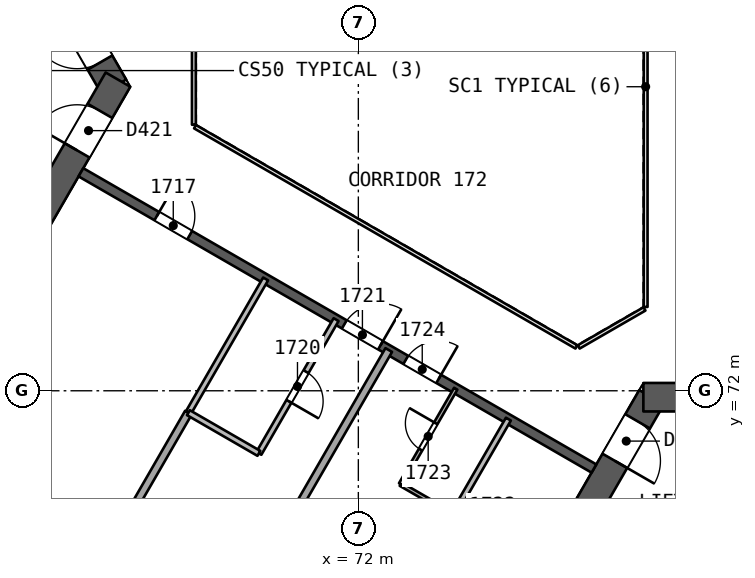
"""IFC4 building model, lengths in metres.
Left out: names, types, materials, properties, quantities, classifications, styles, units other than length and angle.
Written with IfcOpenShell. Run it as: python <this file> out.ifc"""

import sys

from ifc_helpers import new_model, si_unit, direction, frame, frame_2d, origin, place, context, subcontext, project, spatial, rectangle, extrude, element, fill, save


model = new_model("IFC4")
c1 = context("Model", 3, precision=1e-05, world=origin(), true_north=direction((0.0, 1.0)))
c2 = subcontext(c1, "Body", "Model", "MODEL_VIEW")
j1 = project(units=[si_unit("LENGTHUNIT", "METRE"), si_unit("PLANEANGLEUNIT", "RADIAN")], contexts=[c1])
p1 = place(None, origin())
s1 = spatial("IfcSite", under=j1, at=p1, CompositionType="ELEMENT")
p2 = place(p1, origin())
s2 = spatial("IfcBuilding", under=s1, at=p2, CompositionType="ELEMENT")
p3 = place(p2, frame((0.0, 0.0, 75.8)))
s3 = spatial("IfcBuildingStorey", under=s2, at=p3, CompositionType="ELEMENT", Elevation=75.8)
p4 = place(p3, frame((65.567, 80.0, 0.0), z_axis=(0.0, 0.0, 1.0), x_axis=(-0.499988615364, 0.866031976607, 0.0)))
e1 = element("IfcWall", 1, at=p4, inside=s3, PredefinedType="SHEAR", context=c2, shape_type="SweptSolid", body=[
    extrude(rectangle(XDim=10.163, YDim=0.75, at=frame_2d((5.082, 0.0))), origin(), (0.0, 0.0, 1.0), 3.7),
])
p5 = place(p4, frame((0.733, 0.0, 0.0)))
e2 = element("IfcOpeningElement", 2, at=p5, cuts=e1, PredefinedType="OPENING", context=c2, shape_type="SweptSolid", body=[
    extrude(rectangle(XDim=1.2, YDim=2.1, at=frame_2d((0.6, 1.05))), frame((0.0, 0.385, 0.0), z_axis=(0.0, -1.0, 0.0), x_axis=(1.0, 0.0, 0.0)), (0.0, 0.0, 1.0), 0.771),
])
p6 = place(p3, frame((60.673, 71.523, 0.0), z_axis=(0.0, 0.0, 1.0), x_axis=(0.499997052475, 0.866027105532, 0.0)))
e3 = element("IfcWall", 3, at=p6, inside=s3, PredefinedType="SHEAR", context=c2, shape_type="SweptSolid", body=[
    extrude(rectangle(XDim=10.005, YDim=0.75, at=frame_2d((5.002, 0.0))), origin(), (0.0, 0.0, 1.0), 3.7),
])
p7 = place(p6, frame((7.855, 0.0, 0.0)))
e4 = element("IfcOpeningElement", 4, at=p7, cuts=e3, PredefinedType="OPENING", context=c2, shape_type="SweptSolid", body=[
    extrude(rectangle(XDim=1.2, YDim=2.1, at=frame_2d((0.6, 1.05))), frame((0.0, 0.385, 0.0), z_axis=(0.0, -1.0, 0.0), x_axis=(1.0, 0.0, 0.0)), (0.0, 0.0, 1.0), 0.771),
])
p8 = place(p3, frame((79.717, 71.831, 0.0), z_axis=(0.0, 0.0, 1.0), x_axis=(-0.499996230114, -0.866027580318, 0.0)))
e5 = element("IfcWall", 5, at=p8, inside=s3, PredefinedType="SHEAR", context=c2, shape_type="SweptSolid", body=[
    extrude(rectangle(XDim=10.164, YDim=0.75, at=frame_2d((5.082, 0.0))), origin(), (0.0, 0.0, 1.0), 3.7),
])
p9 = place(p8, frame((0.733, 0.0, 0.0)))
e6 = element("IfcOpeningElement", 6, at=p9, cuts=e5, PredefinedType="OPENING", context=c2, shape_type="SweptSolid", body=[
    extrude(rectangle(XDim=1.2, YDim=2.1, at=frame_2d((0.6, 1.05))), frame((0.0, 0.385, 0.0), z_axis=(0.0, -1.0, 0.0), x_axis=(1.0, 0.0, 0.0)), (0.0, 0.0, 1.0), 0.771),
])
p10 = place(p3, frame((89.505, 71.831, 0.0), z_axis=(0.0, 0.0, 1.0), x_axis=(-1.0, 0.0, 0.0)))
e7 = element("IfcWall", 7, at=p10, inside=s3, PredefinedType="SHEAR", context=c2, shape_type="SweptSolid", body=[
    extrude(rectangle(XDim=10.005, YDim=0.75, at=frame_2d((5.002, 0.0))), origin(), (0.0, 0.0, 1.0), 3.7),
])
p11 = place(p10, frame((7.855, 0.0, 0.0)))
e8 = element("IfcOpeningElement", 8, at=p11, cuts=e7, PredefinedType="OPENING", context=c2, shape_type="SweptSolid", body=[
    extrude(rectangle(XDim=1.2, YDim=2.1, at=frame_2d((0.6, 1.05))), frame((0.0, 0.385, 0.0), z_axis=(0.0, -1.0, 0.0), x_axis=(1.0, 0.0, 0.0)), (0.0, 0.0, 1.0), 0.771),
])
p12 = place(p3, frame((64.7, 77.748, 0.0), z_axis=(0.0, 0.0, 1.0), x_axis=(0.866026492143, -0.499998114903, 0.0)))
e9 = element("IfcWall", 9, at=p12, inside=s3, PredefinedType="SHEAR", context=c2, shape_type="SweptSolid", body=[
    extrude(rectangle(XDim=15.588, YDim=0.25, at=frame_2d((7.794, 0.0))), origin(), (0.0, 0.0, 1.0), 3.2),
])
p13 = place(p12, frame((2.306, 0.0, 0.0)))
e10 = element("IfcOpeningElement", 10, at=p13, cuts=e9, PredefinedType="OPENING", context=c2, shape_type="SweptSolid", body=[
    extrude(rectangle(XDim=1.0, YDim=2.1, at=frame_2d((0.5, 1.05))), frame((0.0, 0.135, 0.0), z_axis=(0.0, -1.0, 0.0), x_axis=(1.0, 0.0, 0.0)), (0.0, 0.0, 1.0), 0.271),
])
p14 = place(p12, frame((8.003, 0.0, 0.0)))
e11 = element("IfcOpeningElement", 11, at=p14, cuts=e9, PredefinedType="OPENING", context=c2, shape_type="SweptSolid", body=[
    extrude(rectangle(XDim=1.1, YDim=2.1, at=frame_2d((0.55, 1.05))), frame((0.0, 0.135, 0.0), z_axis=(0.0, -1.0, 0.0), x_axis=(1.0, 0.0, 0.0)), (0.0, 0.0, 1.0), 0.271),
])
p15 = place(p12, frame((9.871, 0.0, 0.0)))
e12 = element("IfcOpeningElement", 12, at=p15, cuts=e9, PredefinedType="OPENING", context=c2, shape_type="SweptSolid", body=[
    extrude(rectangle(XDim=1.0, YDim=2.1, at=frame_2d((0.5, 1.05))), frame((0.0, 0.135, 0.0), z_axis=(0.0, -1.0, 0.0), x_axis=(1.0, 0.0, 0.0)), (0.0, 0.0, 1.0), 0.271),
])
p16 = place(p3, frame((62.897, 63.401, 0.0), z_axis=(0.0, 0.0, 1.0), x_axis=(0.500016752221, 0.866015731669, 0.0)))
e13 = element("IfcWall", 13, at=p16, inside=s3, PredefinedType="PARTITIONING", context=c2, shape_type="SweptSolid", body=[
    extrude(rectangle(XDim=9.263, YDim=0.2, at=frame_2d((4.632, 0.0))), origin(), (0.0, 0.0, 1.0), 3.2),
])
p17 = place(p3, frame((67.529, 71.424, 0.0), z_axis=(0.0, 0.0, 1.0), x_axis=(0.499984252764, 0.866034495264, 0.0)))
e14 = element("IfcWall", 14, at=p17, inside=s3, PredefinedType="PARTITIONING", context=c2, shape_type="SweptSolid", body=[
    extrude(rectangle(XDim=4.063, YDim=0.15, at=frame_2d((2.032, 0.0))), origin(), (0.0, 0.0, 1.0), 3.2),
])
p18 = place(p3, frame((71.414, 73.872, 0.0), z_axis=(0.0, 0.0, 1.0), x_axis=(-0.499984252764, -0.866034495264, 0.0)))
e15 = element("IfcWall", 15, at=p18, inside=s3, PredefinedType="PARTITIONING", context=c2, shape_type="SweptSolid", body=[
    extrude(rectangle(XDim=4.063, YDim=0.15, at=frame_2d((2.032, 0.0))), origin(), (0.0, 0.0, 1.0), 3.2),
])
p19 = place(p18, frame((1.582, 0.0, 0.0)))
e16 = element("IfcOpeningElement", 16, at=p19, cuts=e15, PredefinedType="OPENING", context=c2, shape_type="SweptSolid", body=[
    extrude(rectangle(XDim=0.9, YDim=2.1, at=frame_2d((0.45, 1.05))), frame((0.0, 0.085, 0.0), z_axis=(0.0, -1.0, 0.0), x_axis=(1.0, 0.0, 0.0)), (0.0, 0.0, 1.0), 0.171),
])
p20 = place(p3, frame((69.383, 70.353, 0.0), z_axis=(0.0, 0.0, 1.0), x_axis=(-0.866024183959, 0.500002112793, 0.0)))
e17 = element("IfcWall", 17, at=p20, inside=s3, PredefinedType="PARTITIONING", context=c2, shape_type="SweptSolid", body=[
    extrude(rectangle(XDim=2.141, YDim=0.15, at=frame_2d((1.071, 0.0))), origin(), (0.0, 0.0, 1.0), 3.2),
])
p21 = place(p3, frame((66.137, 61.531, 0.0), z_axis=(0.0, 0.0, 1.0), x_axis=(0.500006843521, 0.86602145264, 0.0)))
e18 = element("IfcWall", 18, at=p21, inside=s3, PredefinedType="PARTITIONING", context=c2, shape_type="SweptSolid", body=[
    extrude(rectangle(XDim=13.326, YDim=0.2, at=frame_2d((6.663, 0.0))), origin(), (0.0, 0.0, 1.0), 3.2),
])
p22 = place(p3, frame((74.498, 68.743, 0.0), z_axis=(0.0, 0.0, 1.0), x_axis=(-0.865989903783, 0.500061482766, 0.0)))
e19 = element("IfcWall", 19, at=p22, inside=s3, PredefinedType="PARTITIONING", context=c2, shape_type="SweptSolid", body=[
    extrude(rectangle(XDim=1.6, YDim=0.1, at=frame_2d((0.8, 0.0))), origin(), (0.0, 0.0, 1.0), 3.2),
])
p23 = place(p3, frame((73.113, 69.543, 0.0), z_axis=(0.0, 0.0, 1.0), x_axis=(0.499987231761, 0.866032775405, 0.0)))
e20 = element("IfcWall", 20, at=p23, inside=s3, PredefinedType="PARTITIONING", context=c2, shape_type="SweptSolid", body=[
    extrude(rectangle(XDim=2.9, YDim=0.1, at=frame_2d((1.45, 0.0))), origin(), (0.0, 0.0, 1.0), 3.2),
])
p24 = place(p23, frame((1.05, 0.0, 0.0)))
e21 = element("IfcOpeningElement", 21, at=p24, cuts=e20, PredefinedType="OPENING", context=c2, shape_type="SweptSolid", body=[
    extrude(rectangle(XDim=0.8, YDim=2.1, at=frame_2d((0.4, 1.05))), frame((0.0, 0.061, 0.0), z_axis=(0.0, -1.0, 0.0), x_axis=(1.0, 0.0, 0.0)), (0.0, 0.0, 1.0), 0.121),
])
p25 = place(p3, frame((75.948, 71.254, 0.0), z_axis=(0.0, 0.0, 1.0), x_axis=(-0.499987231761, -0.866032775405, 0.0)))
e22 = element("IfcWall", 22, at=p25, inside=s3, PredefinedType="PARTITIONING", context=c2, shape_type="SweptSolid", body=[
    extrude(rectangle(XDim=2.9, YDim=0.15, at=frame_2d((1.45, 0.0))), origin(), (0.0, 0.0, 1.0), 3.2),
])
p26 = place(p3, frame((90.332, 47.39, 0.0), z_axis=(0.0, 0.0, 1.0), x_axis=(-0.866024586246, 0.500001416016, 0.0)))
e23 = element("IfcWall", 23, at=p26, inside=s3, PredefinedType="SOLIDWALL", context=c2, shape_type="SweptSolid", body=[
    extrude(rectangle(XDim=59.166, YDim=0.3, at=frame_2d((29.583, 0.0))), origin(), (0.0, 0.0, 1.0), 3.2),
])
p27 = place(p26, frame((28.695, 0.0, 0.0)))
e24 = element("IfcOpeningElement", 24, at=p27, cuts=e23, PredefinedType="OPENING", context=c2, shape_type="SweptSolid", body=[
    extrude(rectangle(XDim=2.4, YDim=2.4, at=frame_2d((1.2, 1.2))), frame((0.0, 0.161, 0.0), z_axis=(0.0, -1.0, 0.0), x_axis=(1.0, 0.0, 0.0)), (0.0, 0.0, 1.0), 0.321),
])
p28 = place(p26, frame((33.372, 0.0, 0.0)))
e25 = element("IfcOpeningElement", 25, at=p28, cuts=e23, PredefinedType="OPENING", context=c2, shape_type="SweptSolid", body=[
    extrude(rectangle(XDim=2.4, YDim=2.4, at=frame_2d((1.2, 1.2))), frame((0.0, 0.161, 0.0), z_axis=(0.0, -1.0, 0.0), x_axis=(1.0, 0.0, 0.0)), (0.0, 0.0, 1.0), 0.321),
])
p29 = place(p26, frame((45.903, 0.0, 0.0)))
e26 = element("IfcOpeningElement", 26, at=p29, cuts=e23, PredefinedType="OPENING", context=c2, shape_type="SweptSolid", body=[
    extrude(rectangle(XDim=2.4, YDim=2.4, at=frame_2d((1.2, 1.2))), frame((0.0, 0.161, 0.0), z_axis=(0.0, -1.0, 0.0), x_axis=(1.0, 0.0, 0.0)), (0.0, 0.0, 1.0), 0.321),
])
p30 = place(p26, frame((12.769, 0.0, 0.0)))
e27 = element("IfcOpeningElement", 27, at=p30, cuts=e23, PredefinedType="OPENING", context=c2, shape_type="SweptSolid", body=[
    extrude(rectangle(XDim=2.4, YDim=2.4, at=frame_2d((1.2, 1.2))), frame((0.0, 0.161, 0.0), z_axis=(0.0, -1.0, 0.0), x_axis=(1.0, 0.0, 0.0)), (0.0, 0.0, 1.0), 0.321),
])
p31 = place(p3, frame((77.135, 64.952, 0.0), z_axis=(0.0, 0.0, 1.0), x_axis=(0.866031916153, 0.499988720078, 0.0)))
e28 = element("IfcWall", 28, at=p31, inside=s3, PredefinedType="SOLIDWALL", context=c2, shape_type="SweptSolid", body=[
    extrude(rectangle(XDim=11.35, YDim=0.2, at=frame_2d((5.675, 0.0))), origin(), (0.0, 0.0, 1.0), 3.2),
])
p32 = place(p3, frame((79.56, 74.206, 0.0), z_axis=(0.0, 0.0, 1.0), x_axis=(0.0, 1.0, 0.0)))
e29 = element("IfcWall", 29, at=p32, inside=s3, PredefinedType="PARTITIONING", context=c2, shape_type="SweptSolid", body=[
    extrude(rectangle(XDim=11.588, YDim=0.1, at=frame_2d((5.794, 0.0))), origin(), (0.0, 0.0, 1.0), 3.2),
])
p33 = place(p3, frame((67.672, 81.0, 0.0), z_axis=(0.0, 0.0, 1.0), x_axis=(0.0, -1.0, 0.0)))
e30 = element("IfcWall", 30, at=p33, inside=s3, PredefinedType="PARTITIONING", context=c2, shape_type="SweptSolid", body=[
    extrude(rectangle(XDim=2.0, YDim=0.1, at=frame_2d((1.0, 0.0))), origin(), (0.0, 0.0, 1.0), 3.2),
])
p34 = place(p3, frame((67.702, 78.948, 0.0), z_axis=(0.0, 0.0, 1.0), x_axis=(0.866026658274, -0.499997827154, 0.0)))
e31 = element("IfcWall", 31, at=p34, inside=s3, PredefinedType="PARTITIONING", context=c2, shape_type="SweptSolid", body=[
    extrude(rectangle(XDim=11.588, YDim=0.1, at=frame_2d((5.794, 0.0))), origin(), (0.0, 0.0, 1.0), 3.2),
])
p35 = place(p3, frame((77.798, 73.154, 0.0), z_axis=(0.0, 0.0, 1.0), x_axis=(0.866041268327, 0.499972520799, 0.0)))
e32 = element("IfcWall", 32, at=p35, inside=s3, PredefinedType="PARTITIONING", context=c2, shape_type="SweptSolid", body=[
    extrude(rectangle(XDim=2.0, YDim=0.1, at=frame_2d((1.0, 0.0))), origin(), (0.0, 0.0, 1.0), 3.2),
])
p36 = place(p13, origin())
e33 = element("IfcDoor", 33, at=p36, inside=s3, OperationType="SINGLE_SWING_LEFT", PredefinedType="NOTDEFINED", context=c2, shape_type="SweptSolid", body=[
    extrude(rectangle(XDim=1.0, YDim=2.1, at=frame_2d((0.5, 1.05))), frame((0.0, 0.025, 0.0), z_axis=(0.0, -1.0, 0.0), x_axis=(1.0, 0.0, 0.0)), (0.0, 0.0, 1.0), 0.05),
])
fill(e10, e33)
p37 = place(p19, origin())
e34 = element("IfcDoor", 34, at=p37, inside=s3, OperationType="SINGLE_SWING_RIGHT", PredefinedType="NOTDEFINED", context=c2, shape_type="SweptSolid", body=[
    extrude(rectangle(XDim=0.9, YDim=2.1, at=frame_2d((0.45, 1.05))), frame((0.0, 0.025, 0.0), z_axis=(0.0, -1.0, 0.0), x_axis=(1.0, 0.0, 0.0)), (0.0, 0.0, 1.0), 0.05),
])
fill(e16, e34)
p38 = place(p14, origin())
e35 = element("IfcDoor", 35, at=p38, inside=s3, OperationType="SINGLE_SWING_RIGHT", PredefinedType="NOTDEFINED", context=c2, shape_type="SweptSolid", body=[
    extrude(rectangle(XDim=1.1, YDim=2.1, at=frame_2d((0.55, 1.05))), frame((0.0, 0.025, 0.0), z_axis=(0.0, -1.0, 0.0), x_axis=(1.0, 0.0, 0.0)), (0.0, 0.0, 1.0), 0.05),
])
fill(e11, e35)
p39 = place(p24, origin())
e36 = element("IfcDoor", 36, at=p39, inside=s3, OperationType="SINGLE_SWING_RIGHT", PredefinedType="NOTDEFINED", context=c2, shape_type="SweptSolid", body=[
    extrude(rectangle(XDim=0.8, YDim=2.1, at=frame_2d((0.4, 1.05))), frame((0.0, 0.025, 0.0), z_axis=(0.0, -1.0, 0.0), x_axis=(1.0, 0.0, 0.0)), (0.0, 0.0, 1.0), 0.05),
])
fill(e21, e36)
p40 = place(p15, origin())
e37 = element("IfcDoor", 37, at=p40, inside=s3, OperationType="SINGLE_SWING_RIGHT", PredefinedType="NOTDEFINED", context=c2, shape_type="SweptSolid", body=[
    extrude(rectangle(XDim=1.0, YDim=2.1, at=frame_2d((0.5, 1.05))), frame((0.0, 0.025, 0.0), z_axis=(0.0, -1.0, 0.0), x_axis=(1.0, 0.0, 0.0)), (0.0, 0.0, 1.0), 0.05),
])
fill(e12, e37)
p41 = place(p5, origin())
e38 = element("IfcDoor", 38, at=p41, inside=s3, OperationType="SINGLE_SWING_RIGHT", PredefinedType="NOTDEFINED", context=c2, shape_type="SweptSolid", body=[
    extrude(rectangle(XDim=1.2, YDim=2.1, at=frame_2d((0.6, 1.05))), frame((0.0, 0.025, 0.0), z_axis=(0.0, -1.0, 0.0), x_axis=(1.0, 0.0, 0.0)), (0.0, 0.0, 1.0), 0.05),
])
fill(e2, e38)
p42 = place(p7, origin())
e39 = element("IfcDoor", 39, at=p42, inside=s3, OperationType="SINGLE_SWING_LEFT", PredefinedType="NOTDEFINED", context=c2, shape_type="SweptSolid", body=[
    extrude(rectangle(XDim=1.2, YDim=2.1, at=frame_2d((0.6, 1.05))), frame((0.0, 0.025, 0.0), z_axis=(0.0, -1.0, 0.0), x_axis=(1.0, 0.0, 0.0)), (0.0, 0.0, 1.0), 0.05),
])
fill(e4, e39)
p43 = place(p9, origin())
e40 = element("IfcDoor", 40, at=p43, inside=s3, OperationType="SINGLE_SWING_RIGHT", PredefinedType="NOTDEFINED", context=c2, shape_type="SweptSolid", body=[
    extrude(rectangle(XDim=1.2, YDim=2.1, at=frame_2d((0.6, 1.05))), frame((0.0, 0.025, 0.0), z_axis=(0.0, -1.0, 0.0), x_axis=(1.0, 0.0, 0.0)), (0.0, 0.0, 1.0), 0.05),
])
fill(e6, e40)
save(model, sys.argv[1])
